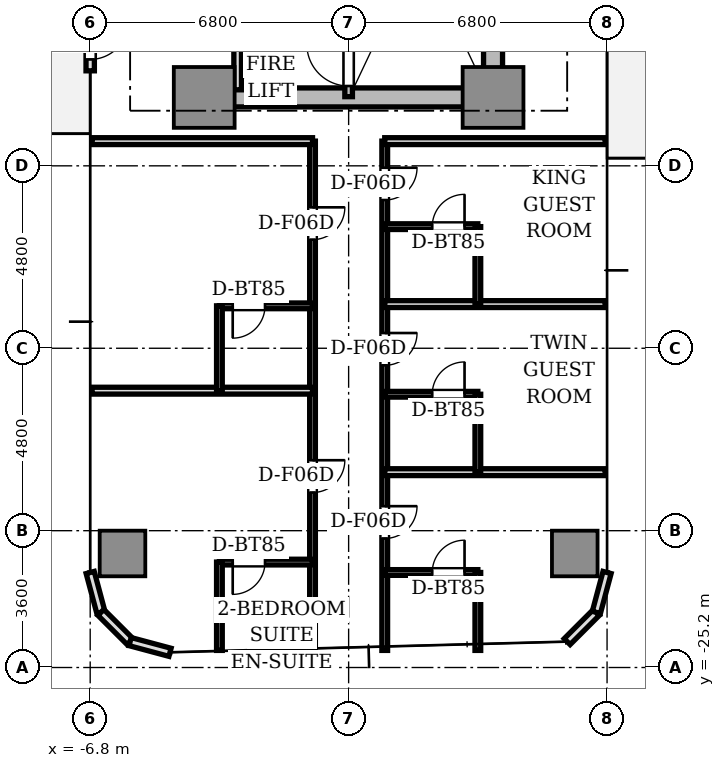
"""IFC4 building model, lengths in metres.
Left out: names, types, materials, properties, quantities, classifications, styles, units other than length and angle.
Written with IfcOpenShell. Run it as: python <this file> out.ifc"""

import sys

from ifc_helpers import new_model, si_unit, direction, frame, frame_2d, origin, origin_2d, place, context, subcontext, project, spatial, rectangle, extrude, source, transform, mapped, element, fill, save


model = new_model("IFC4")
c1 = context("Model", 3, precision=1e-05, world=origin(), true_north=direction((0.0, 1.0)))
c2 = subcontext(c1, "Body", "Model", "MODEL_VIEW")
j1 = project(units=[si_unit("LENGTHUNIT", "METRE"), si_unit("PLANEANGLEUNIT", "RADIAN")], contexts=[c1])
p1 = place(None, origin())
s1 = spatial("IfcSite", under=j1, at=p1, CompositionType="ELEMENT")
p2 = place(p1, origin())
s2 = spatial("IfcBuilding", under=s1, at=p2, CompositionType="ELEMENT")
p3 = place(p2, frame((0.0, 0.0, 39.85)))
s3 = spatial("IfcBuildingStorey", under=s2, at=p3, CompositionType="ELEMENT", Elevation=39.85)
p4 = place(p3, frame((-3.55, -10.2, 0.0), z_axis=(0.0, 0.0, 1.0), x_axis=(1.0, 0.0, 0.0)))
e1 = element("IfcWall", 1, at=p4, inside=s3, PredefinedType="SHEAR", context=c2, shape_type="SweptSolid", body=[
    extrude(rectangle(XDim=7.1, YDim=0.5, at=frame_2d((3.55, 0.0))), origin(), (0.0, 0.0, 1.0), 3.11),
])
p5 = place(p3, frame((3.8, -9.75, 0.0), z_axis=(0.0, 0.0, 1.0), x_axis=(0.0, 1.0, 0.0)))
e2 = element("IfcWall", 2, at=p5, inside=s3, PredefinedType="SHEAR", context=c2, shape_type="SweptSolid", body=[
    extrude(rectangle(XDim=6.9, YDim=0.5, at=frame_2d((3.45, 0.0))), origin(), (0.0, 0.0, 1.0), 3.11),
])
m1 = source(origin(), c2, "Body", "SweptSolid", [
    extrude(rectangle(XDim=1.6, YDim=1.6, at=origin_2d()), origin(), (0.0, 0.0, 1.0), 3.11),
])
for number, where, z_axis, x_axis in (
    (3, (-3.8, -10.2, 0.0), (0.0, 0.0, 1.0), (1.0, 0.0, 0.0)),
    (4, (3.8, -10.2, 0.0), (0.0, 0.0, 1.0), (1.0, 0.0, 0.0)),
):
    element("IfcColumn", number, at=place(p3, frame(where, z_axis=z_axis, x_axis=x_axis)), inside=s3, PredefinedType="COLUMN", context=c2, shape_type="MappedRepresentation", body=[
        mapped(m1, transform((0.0, 0.0, 0.0), scale=1.0)),
    ])
m2 = source(origin(), c2, "Body", "SweptSolid", [
    extrude(rectangle(XDim=1.2, YDim=1.2, at=origin_2d()), origin(), (0.0, 0.0, 1.0), 3.11),
])
for number, where, z_axis, x_axis in (
    (5, (-5.95, -22.2, 0.0), (0.0, 0.0, 1.0), (1.0, 0.0, 0.0)),
    (6, (5.95, -22.2, 0.0), (0.0, 0.0, 1.0), (1.0, 0.0, 0.0)),
):
    element("IfcColumn", number, at=place(p3, frame(where, z_axis=z_axis, x_axis=x_axis)), inside=s3, PredefinedType="COLUMN", context=c2, shape_type="MappedRepresentation", body=[
        mapped(m2, transform((0.0, 0.0, 0.0), scale=1.0)),
    ])
p6 = place(p3, frame((-6.8, -6.8, 0.0), z_axis=(0.0, 0.0, 1.0), x_axis=(0.0, -1.0, 0.0)))
e7 = element("IfcWall", 7, at=p6, inside=s3, PredefinedType="STANDARD", context=c2, shape_type="SweptSolid", body=[
    extrude(rectangle(XDim=2.7, YDim=0.22, at=frame_2d((1.35, 0.0))), origin(), (0.0, 0.0, 1.0), 3.11),
])
p7 = place(p6, frame((1.4, 0.0, 0.0)))
e8 = element("IfcOpeningElement", 8, at=p7, cuts=e7, PredefinedType="OPENING", context=c2, shape_type="SweptSolid", body=[
    extrude(rectangle(XDim=1.0, YDim=2.2, at=frame_2d((0.5, 1.1))), frame((0.0, 0.12, 0.0), z_axis=(0.0, -1.0, 0.0), x_axis=(1.0, 0.0, 0.0)), (0.0, 0.0, 1.0), 0.24),
])
for number, where, z_axis, x_axis in (
    (9, (-6.8, -22.7, 0.0), (0.0, 0.0, 1.0), (0.259, -0.966, 0.0)),
    (10, (-6.519, -23.75, 0.0), (0.0, 0.0, 1.0), (0.707, -0.707, 0.0)),
    (11, (-5.75, -24.519, 0.0), (0.0, 0.0, 1.0), (0.966, -0.259, 0.0)),
    (12, (5.75, -24.519, 0.0), (0.0, 0.0, 1.0), (0.707, 0.707, 0.0)),
    (13, (6.519, -23.75, 0.0), (0.0, 0.0, 1.0), (0.259, 0.966, 0.0)),
):
    element("IfcWall", number, at=place(p3, frame(where, z_axis=z_axis, x_axis=x_axis)), inside=s3, PredefinedType="STANDARD", context=c2, shape_type="SweptSolid", body=[
        extrude(rectangle(XDim=1.087, YDim=0.22, at=frame_2d((0.543, 0.0))), origin(), (0.0, 0.0, 1.0), 3.11),
    ])
p8 = place(p3, frame((0.0, -10.18, 0.0), z_axis=(0.0, 0.0, 1.0), x_axis=(0.0, 1.0, 0.0)))
e14 = element("IfcWall", 14, at=p8, inside=s3, PredefinedType="SOLIDWALL", context=c2, shape_type="SweptSolid", body=[
    extrude(rectangle(XDim=7.68, YDim=0.2, at=frame_2d((3.84, 0.0))), origin(), (0.0, 0.0, 1.0), 3.11),
])
p9 = place(p8, frame((0.28, 0.0, 0.0)))
e15 = element("IfcOpeningElement", 15, at=p9, cuts=e14, PredefinedType="OPENING", context=c2, shape_type="SweptSolid", body=[
    extrude(rectangle(XDim=1.1, YDim=2.15, at=frame_2d((0.55, 1.075))), frame((0.0, 0.11, 0.0), z_axis=(0.0, -1.0, 0.0), x_axis=(1.0, 0.0, 0.0)), (0.0, 0.0, 1.0), 0.22),
])
p10 = place(p3, frame((-2.92, -10.0, 0.0), z_axis=(0.0, 0.0, 1.0), x_axis=(0.0, 1.0, 0.0)))
e16 = element("IfcWall", 16, at=p10, inside=s3, PredefinedType="SOLIDWALL", context=c2, shape_type="SweptSolid", body=[
    extrude(rectangle(XDim=1.44, YDim=0.2, at=frame_2d((0.72, 0.0))), origin(), (0.0, 0.0, 1.0), 2.66),
])
p11 = place(p3, frame((0.95, -11.35, 0.0), z_axis=(0.0, 0.0, 1.0), x_axis=(0.0, -1.0, 0.0)))
e17 = element("IfcWall", 17, at=p11, inside=s3, PredefinedType="PARTITIONING", context=c2, shape_type="SweptSolid", body=[
    extrude(rectangle(XDim=13.4, YDim=0.15, at=frame_2d((6.7, 0.0))), origin(), (0.0, 0.0, 1.0), 2.66),
])
p12 = place(p11, frame((0.7, 0.0, 0.0)))
e18 = element("IfcOpeningElement", 18, at=p12, cuts=e17, PredefinedType="OPENING", context=c2, shape_type="SweptSolid", body=[
    extrude(rectangle(XDim=0.85, YDim=2.1, at=frame_2d((0.425, 1.05))), frame((0.0, 0.085, 0.0), z_axis=(0.0, -1.0, 0.0), x_axis=(1.0, 0.0, 0.0)), (0.0, 0.0, 1.0), 0.17),
])
p13 = place(p11, frame((5.049, 0.0, 0.0)))
e19 = element("IfcOpeningElement", 19, at=p13, cuts=e17, PredefinedType="OPENING", context=c2, shape_type="SweptSolid", body=[
    extrude(rectangle(XDim=0.85, YDim=2.1, at=frame_2d((0.425, 1.05))), frame((0.0, 0.085, 0.0), z_axis=(0.0, -1.0, 0.0), x_axis=(1.0, 0.0, 0.0)), (0.0, 0.0, 1.0), 0.17),
])
p14 = place(p11, frame((9.605, 0.0, 0.0)))
e20 = element("IfcOpeningElement", 20, at=p14, cuts=e17, PredefinedType="OPENING", context=c2, shape_type="SweptSolid", body=[
    extrude(rectangle(XDim=0.85, YDim=2.1, at=frame_2d((0.425, 1.05))), frame((0.0, 0.085, 0.0), z_axis=(0.0, -1.0, 0.0), x_axis=(1.0, 0.0, 0.0)), (0.0, 0.0, 1.0), 0.17),
])
p15 = place(p3, frame((-0.95, -11.35, 0.0), z_axis=(0.0, 0.0, 1.0), x_axis=(0.0, -1.0, 0.0)))
e21 = element("IfcWall", 21, at=p15, inside=s3, PredefinedType="PARTITIONING", context=c2, shape_type="SweptSolid", body=[
    extrude(rectangle(XDim=13.4, YDim=0.15, at=frame_2d((6.7, 0.0))), origin(), (0.0, 0.0, 1.0), 2.66),
])
p16 = place(p15, frame((1.742, 0.0, 0.0)))
e22 = element("IfcOpeningElement", 22, at=p16, cuts=e21, PredefinedType="OPENING", context=c2, shape_type="SweptSolid", body=[
    extrude(rectangle(XDim=0.85, YDim=2.1, at=frame_2d((0.425, 1.05))), frame((0.0, 0.085, 0.0), z_axis=(0.0, -1.0, 0.0), x_axis=(1.0, 0.0, 0.0)), (0.0, 0.0, 1.0), 0.17),
])
p17 = place(p15, frame((8.396, 0.0, 0.0)))
e23 = element("IfcOpeningElement", 23, at=p17, cuts=e21, PredefinedType="OPENING", context=c2, shape_type="SweptSolid", body=[
    extrude(rectangle(XDim=0.85, YDim=2.1, at=frame_2d((0.425, 1.05))), frame((0.0, 0.085, 0.0), z_axis=(0.0, -1.0, 0.0), x_axis=(1.0, 0.0, 0.0)), (0.0, 0.0, 1.0), 0.17),
])
for number, where, z_axis, x_axis in (
    (24, (0.95, -11.35, 0.0), (0.0, 0.0, 1.0), (1.0, 0.0, 0.0)),
    (25, (-6.75, -11.35, 0.0), (0.0, 0.0, 1.0), (1.0, 0.0, 0.0)),
    (26, (0.95, -15.638, 0.0), (0.0, 0.0, 1.0), (1.0, 0.0, 0.0)),
):
    element("IfcWall", number, at=place(p3, frame(where, z_axis=z_axis, x_axis=x_axis)), inside=s3, PredefinedType="PARTITIONING", context=c2, shape_type="SweptSolid", body=[
        extrude(rectangle(XDim=5.8, YDim=0.18, at=frame_2d((2.9, 0.0))), origin(), (0.0, 0.0, 1.0), 2.66),
    ])
p18 = place(p3, frame((0.95, -13.6, 0.0), z_axis=(0.0, 0.0, 1.0), x_axis=(1.0, 0.0, 0.0)))
e27 = element("IfcWall", 27, at=p18, inside=s3, PredefinedType="PARTITIONING", context=c2, shape_type="SweptSolid", body=[
    extrude(rectangle(XDim=2.45, YDim=0.15, at=frame_2d((1.225, 0.0))), origin(), (0.0, 0.0, 1.0), 2.66),
])
p19 = place(p18, frame((1.25, 0.0, 0.0)))
e28 = element("IfcOpeningElement", 28, at=p19, cuts=e27, PredefinedType="OPENING", context=c2, shape_type="SweptSolid", body=[
    extrude(rectangle(XDim=0.85, YDim=2.1, at=frame_2d((0.425, 1.05))), frame((0.0, 0.085, 0.0), z_axis=(0.0, -1.0, 0.0), x_axis=(1.0, 0.0, 0.0)), (0.0, 0.0, 1.0), 0.17),
])
p20 = place(p3, frame((3.4, -13.6, 0.0), z_axis=(0.0, 0.0, 1.0), x_axis=(0.0, -1.0, 0.0)))
e29 = element("IfcWall", 29, at=p20, inside=s3, PredefinedType="PARTITIONING", context=c2, shape_type="SweptSolid", body=[
    extrude(rectangle(XDim=2.038, YDim=0.15, at=frame_2d((1.019, 0.0))), origin(), (0.0, 0.0, 1.0), 2.66),
])
p21 = place(p3, frame((0.95, -20.06, 0.0), z_axis=(0.0, 0.0, 1.0), x_axis=(1.0, 0.0, 0.0)))
e30 = element("IfcWall", 30, at=p21, inside=s3, PredefinedType="PARTITIONING", context=c2, shape_type="SweptSolid", body=[
    extrude(rectangle(XDim=5.8, YDim=0.18, at=frame_2d((2.9, 0.0))), origin(), (0.0, 0.0, 1.0), 2.66),
])
p22 = place(p3, frame((0.95, -18.01, 0.0), z_axis=(0.0, 0.0, 1.0), x_axis=(1.0, 0.0, 0.0)))
e31 = element("IfcWall", 31, at=p22, inside=s3, PredefinedType="PARTITIONING", context=c2, shape_type="SweptSolid", body=[
    extrude(rectangle(XDim=2.45, YDim=0.15, at=frame_2d((1.225, 0.0))), origin(), (0.0, 0.0, 1.0), 2.66),
])
p23 = place(p22, frame((1.25, 0.0, 0.0)))
e32 = element("IfcOpeningElement", 32, at=p23, cuts=e31, PredefinedType="OPENING", context=c2, shape_type="SweptSolid", body=[
    extrude(rectangle(XDim=0.85, YDim=2.1, at=frame_2d((0.425, 1.05))), frame((0.0, 0.085, 0.0), z_axis=(0.0, -1.0, 0.0), x_axis=(1.0, 0.0, 0.0)), (0.0, 0.0, 1.0), 0.17),
])
p24 = place(p3, frame((3.4, -18.01, 0.0), z_axis=(0.0, 0.0, 1.0), x_axis=(0.0, -1.0, 0.0)))
e33 = element("IfcWall", 33, at=p24, inside=s3, PredefinedType="PARTITIONING", context=c2, shape_type="SweptSolid", body=[
    extrude(rectangle(XDim=2.05, YDim=0.15, at=frame_2d((1.025, 0.0))), origin(), (0.0, 0.0, 1.0), 2.66),
])
p25 = place(p3, frame((0.95, -22.7, 0.0), z_axis=(0.0, 0.0, 1.0), x_axis=(1.0, 0.0, 0.0)))
e34 = element("IfcWall", 34, at=p25, inside=s3, PredefinedType="PARTITIONING", context=c2, shape_type="SweptSolid", body=[
    extrude(rectangle(XDim=2.45, YDim=0.15, at=frame_2d((1.225, 0.0))), origin(), (0.0, 0.0, 1.0), 2.66),
])
p26 = place(p25, frame((1.25, 0.0, 0.0)))
e35 = element("IfcOpeningElement", 35, at=p26, cuts=e34, PredefinedType="OPENING", context=c2, shape_type="SweptSolid", body=[
    extrude(rectangle(XDim=0.85, YDim=2.1, at=frame_2d((0.425, 1.05))), frame((0.0, 0.085, 0.0), z_axis=(0.0, -1.0, 0.0), x_axis=(1.0, 0.0, 0.0)), (0.0, 0.0, 1.0), 0.17),
])
p27 = place(p3, frame((3.4, -22.7, 0.0), z_axis=(0.0, 0.0, 1.0), x_axis=(0.0, -1.0, 0.0)))
e36 = element("IfcWall", 36, at=p27, inside=s3, PredefinedType="PARTITIONING", context=c2, shape_type="SweptSolid", body=[
    extrude(rectangle(XDim=2.05, YDim=0.15, at=frame_2d((1.025, 0.0))), origin(), (0.0, 0.0, 1.0), 2.66),
])
p28 = place(p3, frame((-0.95, -17.916, 0.0), z_axis=(0.0, 0.0, 1.0), x_axis=(-1.0, 0.0, 0.0)))
e37 = element("IfcWall", 37, at=p28, inside=s3, PredefinedType="PARTITIONING", context=c2, shape_type="SweptSolid", body=[
    extrude(rectangle(XDim=5.8, YDim=0.18, at=frame_2d((2.9, 0.0))), origin(), (0.0, 0.0, 1.0), 2.66),
])
p29 = place(p3, frame((-0.95, -15.684, 0.0), z_axis=(0.0, 0.0, 1.0), x_axis=(-1.0, 0.0, 0.0)))
e38 = element("IfcWall", 38, at=p29, inside=s3, PredefinedType="PARTITIONING", context=c2, shape_type="SweptSolid", body=[
    extrude(rectangle(XDim=2.45, YDim=0.15, at=frame_2d((1.225, 0.0))), origin(), (0.0, 0.0, 1.0), 2.66),
])
p30 = place(p29, frame((1.25, 0.0, 0.0)))
e39 = element("IfcOpeningElement", 39, at=p30, cuts=e38, PredefinedType="OPENING", context=c2, shape_type="SweptSolid", body=[
    extrude(rectangle(XDim=0.85, YDim=2.1, at=frame_2d((0.425, 1.05))), frame((0.0, 0.085, 0.0), z_axis=(0.0, -1.0, 0.0), x_axis=(1.0, 0.0, 0.0)), (0.0, 0.0, 1.0), 0.17),
])
p31 = place(p3, frame((-3.4, -15.684, 0.0), z_axis=(0.0, 0.0, 1.0), x_axis=(0.0, -1.0, 0.0)))
e40 = element("IfcWall", 40, at=p31, inside=s3, PredefinedType="PARTITIONING", context=c2, shape_type="SweptSolid", body=[
    extrude(rectangle(XDim=2.232, YDim=0.15, at=frame_2d((1.116, 0.0))), origin(), (0.0, 0.0, 1.0), 2.66),
])
p32 = place(p3, frame((-0.95, -22.426, 0.0), z_axis=(0.0, 0.0, 1.0), x_axis=(-1.0, 0.0, 0.0)))
e41 = element("IfcWall", 41, at=p32, inside=s3, PredefinedType="PARTITIONING", context=c2, shape_type="SweptSolid", body=[
    extrude(rectangle(XDim=2.45, YDim=0.15, at=frame_2d((1.225, 0.0))), origin(), (0.0, 0.0, 1.0), 2.58),
])
p33 = place(p32, frame((1.25, 0.0, 0.0)))
e42 = element("IfcOpeningElement", 42, at=p33, cuts=e41, PredefinedType="OPENING", context=c2, shape_type="SweptSolid", body=[
    extrude(rectangle(XDim=0.85, YDim=2.1, at=frame_2d((0.425, 1.05))), frame((0.0, 0.085, 0.0), z_axis=(0.0, -1.0, 0.0), x_axis=(1.0, 0.0, 0.0)), (0.0, 0.0, 1.0), 0.17),
])
p34 = place(p3, frame((-3.4, -22.426, 0.0), z_axis=(0.0, 0.0, 1.0), x_axis=(0.0, -1.0, 0.0)))
e43 = element("IfcWall", 43, at=p34, inside=s3, PredefinedType="PARTITIONING", context=c2, shape_type="SweptSolid", body=[
    extrude(rectangle(XDim=2.324, YDim=0.15, at=frame_2d((1.162, 0.0))), origin(), (0.0, 0.0, 1.0), 2.66),
])
m3 = source(origin(), c2, "Body", "SweptSolid", [
    extrude(rectangle(XDim=1.0, YDim=0.05, at=origin_2d()), origin(), (0.0, 0.0, 1.0), 2.2),
])
p35 = place(p7, frame((0.5, 0.0, 0.0)))
e44 = element("IfcDoor", 44, at=p35, inside=s3, OperationType="SINGLE_SWING_LEFT", PredefinedType="DOOR", context=c2, shape_type="MappedRepresentation", body=[
    mapped(m3, transform((0.0, 0.0, 0.0), scale=1.0)),
])
fill(e8, e44)
m4 = source(origin(), c2, "Body", "SweptSolid", [
    extrude(rectangle(XDim=1.1, YDim=0.05, at=origin_2d()), origin(), (0.0, 0.0, 1.0), 2.15),
])
p36 = place(p9, frame((0.55, 0.0, 0.0)))
e45 = element("IfcDoor", 45, at=p36, inside=s3, OperationType="SINGLE_SWING_RIGHT", PredefinedType="DOOR", context=c2, shape_type="MappedRepresentation", body=[
    mapped(m4, transform((0.0, 0.0, 0.0), scale=1.0)),
])
fill(e15, e45)
m5 = source(origin(), c2, "Body", "SweptSolid", [
    extrude(rectangle(XDim=0.85, YDim=0.05, at=origin_2d()), origin(), (0.0, 0.0, 1.0), 2.1),
])
p37 = place(p19, frame((0.425, 0.0, 0.0)))
e46 = element("IfcDoor", 46, at=p37, inside=s3, OperationType="SINGLE_SWING_RIGHT", PredefinedType="DOOR", context=c2, shape_type="MappedRepresentation", body=[
    mapped(m5, transform((0.0, 0.0, 0.0), scale=1.0)),
])
fill(e28, e46)
p38 = place(p12, frame((0.425, 0.0, 0.0)))
e47 = element("IfcDoor", 47, at=p38, inside=s3, OperationType="SINGLE_SWING_LEFT", PredefinedType="DOOR", context=c2, shape_type="MappedRepresentation", body=[
    mapped(m5, transform((0.0, 0.0, 0.0), scale=1.0)),
])
fill(e18, e47)
p39 = place(p23, frame((0.425, 0.0, 0.0)))
e48 = element("IfcDoor", 48, at=p39, inside=s3, OperationType="SINGLE_SWING_RIGHT", PredefinedType="DOOR", context=c2, shape_type="MappedRepresentation", body=[
    mapped(m5, transform((0.0, 0.0, 0.0), scale=1.0)),
])
fill(e32, e48)
p40 = place(p13, frame((0.425, 0.0, 0.0)))
e49 = element("IfcDoor", 49, at=p40, inside=s3, OperationType="SINGLE_SWING_LEFT", PredefinedType="DOOR", context=c2, shape_type="MappedRepresentation", body=[
    mapped(m5, transform((0.0, 0.0, 0.0), scale=1.0)),
])
fill(e19, e49)
p41 = place(p26, frame((0.425, 0.0, 0.0)))
e50 = element("IfcDoor", 50, at=p41, inside=s3, OperationType="SINGLE_SWING_RIGHT", PredefinedType="DOOR", context=c2, shape_type="MappedRepresentation", body=[
    mapped(m5, transform((0.0, 0.0, 0.0), scale=1.0)),
])
fill(e35, e50)
p42 = place(p14, frame((0.425, 0.0, 0.0)))
e51 = element("IfcDoor", 51, at=p42, inside=s3, OperationType="SINGLE_SWING_LEFT", PredefinedType="DOOR", context=c2, shape_type="MappedRepresentation", body=[
    mapped(m5, transform((0.0, 0.0, 0.0), scale=1.0)),
])
fill(e20, e51)
p43 = place(p30, frame((0.425, 0.0, 0.0)))
e52 = element("IfcDoor", 52, at=p43, inside=s3, OperationType="SINGLE_SWING_RIGHT", PredefinedType="DOOR", context=c2, shape_type="MappedRepresentation", body=[
    mapped(m5, transform((0.0, 0.0, 0.0), scale=1.0)),
])
fill(e39, e52)
p44 = place(p16, frame((0.425, 0.0, 0.0)))
e53 = element("IfcDoor", 53, at=p44, inside=s3, OperationType="SINGLE_SWING_LEFT", PredefinedType="DOOR", context=c2, shape_type="MappedRepresentation", body=[
    mapped(m5, transform((0.0, 0.0, 0.0), scale=1.0)),
])
fill(e22, e53)
p45 = place(p33, frame((0.425, 0.0, 0.0)))
e54 = element("IfcDoor", 54, at=p45, inside=s3, OperationType="SINGLE_SWING_RIGHT", PredefinedType="DOOR", context=c2, shape_type="MappedRepresentation", body=[
    mapped(m5, transform((0.0, 0.0, 0.0), scale=1.0)),
])
fill(e42, e54)
p46 = place(p17, frame((0.425, 0.0, 0.0)))
e55 = element("IfcDoor", 55, at=p46, inside=s3, OperationType="SINGLE_SWING_LEFT", PredefinedType="DOOR", context=c2, shape_type="MappedRepresentation", body=[
    mapped(m5, transform((0.0, 0.0, 0.0), scale=1.0)),
])
fill(e23, e55)
save(model, sys.argv[1])
